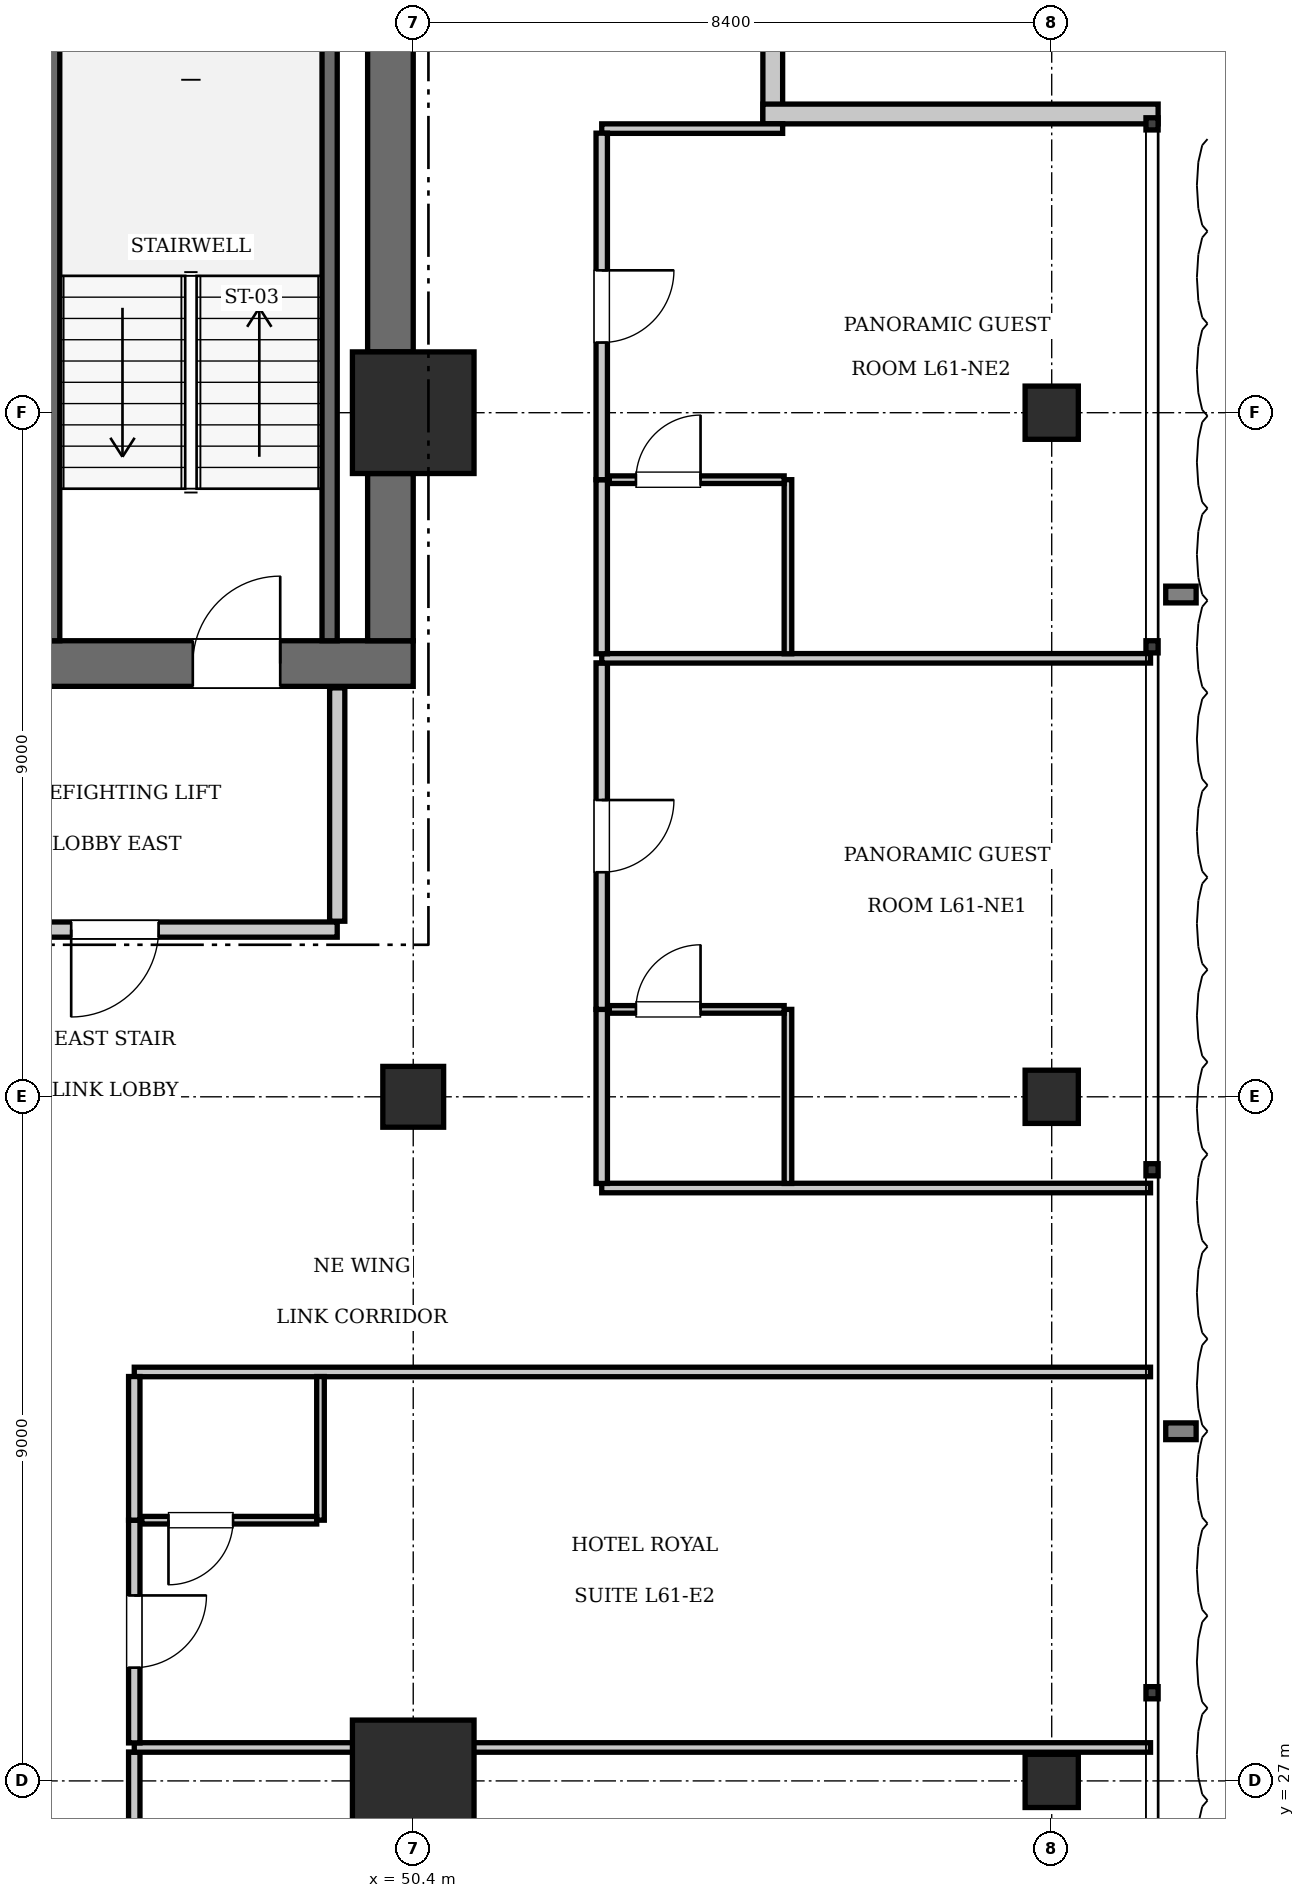
"""IFC4 building model, lengths in metres.
Left out: names, types, materials, properties, quantities, classifications, styles, units other than length and angle.
Written with IfcOpenShell. Run it as: python <this file> out.ifc"""

import sys

from ifc_helpers import new_model, si_unit, direction, frame, frame_2d, origin, origin_2d, place, context, subcontext, project, spatial, rectangle, extrude, element, fill, save


model = new_model("IFC4")
c1 = context("Model", 3, precision=1e-05, world=origin(), true_north=direction((0.0, 1.0)))
c2 = subcontext(c1, "Body", "Model", "MODEL_VIEW")
j1 = project(units=[si_unit("LENGTHUNIT", "METRE"), si_unit("PLANEANGLEUNIT", "RADIAN")], contexts=[c1])
p1 = place(None, origin())
s1 = spatial("IfcSite", under=j1, at=p1, CompositionType="ELEMENT")
p2 = place(p1, origin())
s2 = spatial("IfcBuilding", under=s1, at=p2, CompositionType="ELEMENT")
p3 = place(p2, frame((0.0, 0.0, 250.95)))
s3 = spatial("IfcBuildingStorey", under=s2, at=p3, CompositionType="ELEMENT", Elevation=250.95)
for number, where, z_axis, x_axis in (
    (1, (50.4, 27.0, 0.0), (0.0, 0.0, 1.0), (1.0, 0.0, 0.0)),
    (2, (50.4, 45.0, 0.0), (0.0, 0.0, 1.0), (1.0, 0.0, 0.0)),
):
    element("IfcColumn", number, at=place(p3, frame(where, z_axis=z_axis, x_axis=x_axis)), inside=s3, PredefinedType="COLUMN", context=c2, shape_type="SweptSolid", body=[
        extrude(rectangle(XDim=1.6, YDim=1.6, at=origin_2d()), origin(), (0.0, 0.0, 1.0), 3.85),
    ])
p4 = place(p3, frame((43.6, 41.7, 0.0), z_axis=(0.0, 0.0, 1.0), x_axis=(1.0, 0.0, 0.0)))
e3 = element("IfcWall", 3, at=p4, inside=s3, PredefinedType="SHEAR", context=c2, shape_type="SweptSolid", body=[
    extrude(rectangle(XDim=6.8, YDim=0.6, at=frame_2d((3.4, 0.0))), origin(), (0.0, 0.0, 1.0), 3.85),
])
p5 = place(p4, frame((3.9, 0.0, 0.0)))
e4 = element("IfcOpeningElement", 4, at=p5, cuts=e3, PredefinedType="OPENING", context=c2, shape_type="SweptSolid", body=[
    extrude(rectangle(XDim=1.15, YDim=2.15, at=frame_2d((0.575, 1.075))), frame((0.0, 0.31, 0.0), z_axis=(0.0, -1.0, 0.0), x_axis=(1.0, 0.0, 0.0)), (0.0, 0.0, 1.0), 0.62),
])
p6 = place(p4, frame((0.55, 0.0, 0.0)))
e5 = element("IfcOpeningElement", 5, at=p6, cuts=e3, PredefinedType="OPENING", context=c2, shape_type="SweptSolid", body=[
    extrude(rectangle(XDim=1.1, YDim=2.2, at=frame_2d((0.55, 1.1))), frame((0.0, 0.31, 0.0), z_axis=(0.0, -1.0, 0.0), x_axis=(1.0, 0.0, 0.0)), (0.0, 0.0, 1.0), 0.62),
])
p7 = place(p3, frame((50.1, 42.0, 0.0), z_axis=(0.0, 0.0, 1.0), x_axis=(0.0, 1.0, 0.0)))
e6 = element("IfcWall", 6, at=p7, inside=s3, PredefinedType="SHEAR", context=c2, shape_type="SweptSolid", body=[
    extrude(rectangle(XDim=2.2, YDim=0.6, at=frame_2d((1.1, 0.0))), origin(), (0.0, 0.0, 1.0), 3.85),
])
p8 = place(p3, frame((50.1, 45.8, 0.0), z_axis=(0.0, 0.0, 1.0), x_axis=(0.0, 1.0, 0.0)))
e7 = element("IfcWall", 7, at=p8, inside=s3, PredefinedType="SHEAR", context=c2, shape_type="SweptSolid", body=[
    extrude(rectangle(XDim=7.6, YDim=0.6, at=frame_2d((3.8, 0.0))), origin(), (0.0, 0.0, 1.0), 3.85),
])
p9 = place(p3, frame((50.4, 36.0, 0.0), z_axis=(0.0, 0.0, 1.0), x_axis=(1.0, 0.0, 0.0)))
e8 = element("IfcColumn", 8, at=p9, inside=s3, PredefinedType="COLUMN", context=c2, shape_type="SweptSolid", body=[
    extrude(rectangle(XDim=0.8, YDim=0.8, at=origin_2d()), origin(), (0.0, 0.0, 1.0), 3.85),
])
for number, where, z_axis, x_axis in (
    (9, (58.8, 27.0, 0.0), (0.0, 0.0, 1.0), (1.0, 0.0, 0.0)),
    (10, (58.8, 36.0, 0.0), (0.0, 0.0, 1.0), (1.0, 0.0, 0.0)),
    (11, (58.8, 45.0, 0.0), (0.0, 0.0, 1.0), (1.0, 0.0, 0.0)),
):
    element("IfcColumn", number, at=place(p3, frame(where, z_axis=z_axis, x_axis=x_axis)), inside=s3, PredefinedType="COLUMN", context=c2, shape_type="SweptSolid", body=[
        extrude(rectangle(XDim=0.7, YDim=0.7, at=origin_2d()), origin(), (0.0, 0.0, 1.0), 3.85),
    ])
p10 = place(p3, frame((45.65, 42.0, 0.0), z_axis=(0.0, 0.0, 1.0), x_axis=(0.0, 1.0, 0.0)))
e12 = element("IfcWall", 12, at=p10, inside=s3, PredefinedType="SOLIDWALL", context=c2, shape_type="SweptSolid", body=[
    extrude(rectangle(XDim=9.15, YDim=0.2, at=frame_2d((4.575, 0.0))), origin(), (0.0, 0.0, 1.0), 3.61),
])
p11 = place(p3, frame((49.3, 42.0, 0.0), z_axis=(0.0, 0.0, 1.0), x_axis=(0.0, 1.0, 0.0)))
e13 = element("IfcWall", 13, at=p11, inside=s3, PredefinedType="SOLIDWALL", context=c2, shape_type="SweptSolid", body=[
    extrude(rectangle(XDim=9.12, YDim=0.2, at=frame_2d((4.56, 0.0))), origin(), (0.0, 0.0, 1.0), 3.61),
])
for number, where, z_axis, x_axis in (
    (14, (55.13, 54.0, 0.0), (0.0, 0.0, 1.0), (0.0, -1.0, 0.0)),
    (15, (55.0, 48.93, 0.0), (0.0, 0.0, 1.0), (1.0, 0.0, 0.0)),
):
    element("IfcWall", number, at=place(p3, frame(where, z_axis=z_axis, x_axis=x_axis)), inside=s3, PredefinedType="SOLIDWALL", context=c2, shape_type="SweptSolid", body=[
        extrude(rectangle(XDim=5.2, YDim=0.26, at=frame_2d((2.6, 0.0))), origin(), (0.0, 0.0, 1.0), 3.61),
    ])
p12 = place(p3, frame((43.6, 38.2, 0.0), z_axis=(0.0, 0.0, 1.0), x_axis=(1.0, 0.0, 0.0)))
e16 = element("IfcWall", 16, at=p12, inside=s3, PredefinedType="PARTITIONING", context=c2, shape_type="SweptSolid", body=[
    extrude(rectangle(XDim=5.8, YDim=0.2, at=frame_2d((2.9, 0.0))), origin(), (0.0, 0.0, 1.0), 3.61),
])
p13 = place(p12, frame((2.3, 0.0, 0.0)))
e17 = element("IfcOpeningElement", 17, at=p13, cuts=e16, PredefinedType="OPENING", context=c2, shape_type="SweptSolid", body=[
    extrude(rectangle(XDim=1.15, YDim=2.15, at=frame_2d((0.575, 1.075))), frame((0.0, 0.11, 0.0), z_axis=(0.0, -1.0, 0.0), x_axis=(1.0, 0.0, 0.0)), (0.0, 0.0, 1.0), 0.22),
])
p14 = place(p3, frame((49.4, 38.31, 0.0), z_axis=(0.0, 0.0, 1.0), x_axis=(0.0, 1.0, 0.0)))
e18 = element("IfcWall", 18, at=p14, inside=s3, PredefinedType="PARTITIONING", context=c2, shape_type="SweptSolid", body=[
    extrude(rectangle(XDim=3.07, YDim=0.2, at=frame_2d((1.535, 0.0))), origin(), (0.0, 0.0, 1.0), 3.61),
])
p15 = place(p3, frame((46.73, 32.38, 0.0), z_axis=(0.0, 0.0, 1.0), x_axis=(1.0, 0.0, 0.0)))
e19 = element("IfcWall", 19, at=p15, inside=s3, PredefinedType="PARTITIONING", context=c2, shape_type="SweptSolid", body=[
    extrude(rectangle(XDim=13.37, YDim=0.125, at=frame_2d((6.685, 0.0))), origin(), (0.0, 0.0, 1.0), 3.61),
])
p16 = place(p3, frame((46.73, 24.45, 0.0), z_axis=(0.0, 0.0, 1.0), x_axis=(0.0, 1.0, 0.0)))
e20 = element("IfcWall", 20, at=p16, inside=s3, PredefinedType="PARTITIONING", context=c2, shape_type="SweptSolid", body=[
    extrude(rectangle(XDim=2.93, YDim=0.15, at=frame_2d((1.465, 0.0))), origin(), (0.0, 0.0, 1.0), 3.61),
])
p17 = place(p16, frame((0.99, 0.0, 0.0)))
e21 = element("IfcOpeningElement", 21, at=p17, cuts=e20, PredefinedType="OPENING", context=c2, shape_type="SweptSolid", body=[
    extrude(rectangle(XDim=0.95, YDim=2.15, at=frame_2d((0.475, 1.075))), frame((0.0, 0.085, 0.0), z_axis=(0.0, -1.0, 0.0), x_axis=(1.0, 0.0, 0.0)), (0.0, 0.0, 1.0), 0.17),
])
p18 = place(p3, frame((46.73, 27.44, 0.0), z_axis=(0.0, 0.0, 1.0), x_axis=(1.0, 0.0, 0.0)))
e22 = element("IfcWall", 22, at=p18, inside=s3, PredefinedType="PARTITIONING", context=c2, shape_type="SweptSolid", body=[
    extrude(rectangle(XDim=13.37, YDim=0.125, at=frame_2d((6.685, 0.0))), origin(), (0.0, 0.0, 1.0), 3.61),
])
p19 = place(p3, frame((46.73, 27.5, 0.0), z_axis=(0.0, 0.0, 1.0), x_axis=(0.0, 1.0, 0.0)))
e23 = element("IfcWall", 23, at=p19, inside=s3, PredefinedType="PARTITIONING", context=c2, shape_type="SweptSolid", body=[
    extrude(rectangle(XDim=2.93, YDim=0.15, at=frame_2d((1.465, 0.0))), origin(), (0.0, 0.0, 1.0), 3.61),
])
p20 = place(p19, frame((0.99, 0.0, 0.0)))
e24 = element("IfcOpeningElement", 24, at=p20, cuts=e23, PredefinedType="OPENING", context=c2, shape_type="SweptSolid", body=[
    extrude(rectangle(XDim=0.95, YDim=2.15, at=frame_2d((0.475, 1.075))), frame((0.0, 0.085, 0.0), z_axis=(0.0, -1.0, 0.0), x_axis=(1.0, 0.0, 0.0)), (0.0, 0.0, 1.0), 0.17),
])
p21 = place(p3, frame((46.73, 30.43, 0.0), z_axis=(0.0, 0.0, 1.0), x_axis=(0.0, 1.0, 0.0)))
e25 = element("IfcWall", 25, at=p21, inside=s3, PredefinedType="PARTITIONING", context=c2, shape_type="SweptSolid", body=[
    extrude(rectangle(XDim=1.89, YDim=0.15, at=frame_2d((0.945, 0.0))), origin(), (0.0, 0.0, 1.0), 3.61),
])
p22 = place(p3, frame((49.18, 30.43, 0.0), z_axis=(0.0, 0.0, 1.0), x_axis=(0.0, 1.0, 0.0)))
e26 = element("IfcWall", 26, at=p22, inside=s3, PredefinedType="PARTITIONING", context=c2, shape_type="SweptSolid", body=[
    extrude(rectangle(XDim=1.89, YDim=0.1, at=frame_2d((0.945, 0.0))), origin(), (0.0, 0.0, 1.0), 3.61),
])
p23 = place(p3, frame((46.83, 30.43, 0.0), z_axis=(0.0, 0.0, 1.0), x_axis=(1.0, 0.0, 0.0)))
e27 = element("IfcWall", 27, at=p23, inside=s3, PredefinedType="PARTITIONING", context=c2, shape_type="SweptSolid", body=[
    extrude(rectangle(XDim=2.3, YDim=0.1, at=frame_2d((1.15, 0.0))), origin(), (0.0, 0.0, 1.0), 3.61),
])
p24 = place(p23, frame((0.35, 0.0, 0.0)))
e28 = element("IfcOpeningElement", 28, at=p24, cuts=e27, PredefinedType="OPENING", context=c2, shape_type="SweptSolid", body=[
    extrude(rectangle(XDim=0.85, YDim=2.1, at=frame_2d((0.425, 1.05))), frame((0.0, 0.06, 0.0), z_axis=(0.0, -1.0, 0.0), x_axis=(1.0, 0.0, 0.0)), (0.0, 0.0, 1.0), 0.12),
])
p25 = place(p3, frame((52.88, 34.8, 0.0), z_axis=(0.0, 0.0, 1.0), x_axis=(1.0, 0.0, 0.0)))
e29 = element("IfcWall", 29, at=p25, inside=s3, PredefinedType="PARTITIONING", context=c2, shape_type="SweptSolid", body=[
    extrude(rectangle(XDim=7.22, YDim=0.125, at=frame_2d((3.61, 0.0))), origin(), (0.0, 0.0, 1.0), 3.61),
])
p26 = place(p3, frame((52.88, 48.738, 0.0), z_axis=(0.0, 0.0, 1.0), x_axis=(1.0, 0.0, 0.0)))
e30 = element("IfcWall", 30, at=p26, inside=s3, PredefinedType="PARTITIONING", context=c2, shape_type="SweptSolid", body=[
    extrude(rectangle(XDim=2.38, YDim=0.125, at=frame_2d((1.19, 0.0))), origin(), (0.0, 0.0, 1.0), 3.61),
])
p27 = place(p3, frame((52.88, 34.86, 0.0), z_axis=(0.0, 0.0, 1.0), x_axis=(0.0, 1.0, 0.0)))
e31 = element("IfcWall", 31, at=p27, inside=s3, PredefinedType="PARTITIONING", context=c2, shape_type="SweptSolid", body=[
    extrude(rectangle(XDim=2.29, YDim=0.15, at=frame_2d((1.145, 0.0))), origin(), (0.0, 0.0, 1.0), 3.61),
])
p28 = place(p3, frame((52.88, 37.15, 0.0), z_axis=(0.0, 0.0, 1.0), x_axis=(0.0, 1.0, 0.0)))
e32 = element("IfcWall", 32, at=p28, inside=s3, PredefinedType="PARTITIONING", context=c2, shape_type="SweptSolid", body=[
    extrude(rectangle(XDim=4.559, YDim=0.15, at=frame_2d((2.279, 0.0))), origin(), (0.0, 0.0, 1.0), 3.61),
])
p29 = place(p28, frame((1.804, 0.0, 0.0)))
e33 = element("IfcOpeningElement", 33, at=p29, cuts=e32, PredefinedType="OPENING", context=c2, shape_type="SweptSolid", body=[
    extrude(rectangle(XDim=0.95, YDim=2.15, at=frame_2d((0.475, 1.075))), frame((0.0, 0.085, 0.0), z_axis=(0.0, -1.0, 0.0), x_axis=(1.0, 0.0, 0.0)), (0.0, 0.0, 1.0), 0.17),
])
p30 = place(p3, frame((55.33, 34.86, 0.0), z_axis=(0.0, 0.0, 1.0), x_axis=(0.0, 1.0, 0.0)))
e34 = element("IfcWall", 34, at=p30, inside=s3, PredefinedType="PARTITIONING", context=c2, shape_type="SweptSolid", body=[
    extrude(rectangle(XDim=2.29, YDim=0.1, at=frame_2d((1.145, 0.0))), origin(), (0.0, 0.0, 1.0), 3.61),
])
p31 = place(p3, frame((52.98, 37.15, 0.0), z_axis=(0.0, 0.0, 1.0), x_axis=(1.0, 0.0, 0.0)))
e35 = element("IfcWall", 35, at=p31, inside=s3, PredefinedType="PARTITIONING", context=c2, shape_type="SweptSolid", body=[
    extrude(rectangle(XDim=2.3, YDim=0.1, at=frame_2d((1.15, 0.0))), origin(), (0.0, 0.0, 1.0), 3.61),
])
p32 = place(p31, frame((0.35, 0.0, 0.0)))
e36 = element("IfcOpeningElement", 36, at=p32, cuts=e35, PredefinedType="OPENING", context=c2, shape_type="SweptSolid", body=[
    extrude(rectangle(XDim=0.85, YDim=2.1, at=frame_2d((0.425, 1.05))), frame((0.0, 0.06, 0.0), z_axis=(0.0, -1.0, 0.0), x_axis=(1.0, 0.0, 0.0)), (0.0, 0.0, 1.0), 0.12),
])
p33 = place(p3, frame((52.88, 41.769, 0.0), z_axis=(0.0, 0.0, 1.0), x_axis=(1.0, 0.0, 0.0)))
e37 = element("IfcWall", 37, at=p33, inside=s3, PredefinedType="PARTITIONING", context=c2, shape_type="SweptSolid", body=[
    extrude(rectangle(XDim=7.22, YDim=0.125, at=frame_2d((3.61, 0.0))), origin(), (0.0, 0.0, 1.0), 3.61),
])
p34 = place(p3, frame((52.88, 41.829, 0.0), z_axis=(0.0, 0.0, 1.0), x_axis=(0.0, 1.0, 0.0)))
e38 = element("IfcWall", 38, at=p34, inside=s3, PredefinedType="PARTITIONING", context=c2, shape_type="SweptSolid", body=[
    extrude(rectangle(XDim=2.29, YDim=0.15, at=frame_2d((1.145, 0.0))), origin(), (0.0, 0.0, 1.0), 3.61),
])
p35 = place(p3, frame((52.88, 44.119, 0.0), z_axis=(0.0, 0.0, 1.0), x_axis=(0.0, 1.0, 0.0)))
e39 = element("IfcWall", 39, at=p35, inside=s3, PredefinedType="PARTITIONING", context=c2, shape_type="SweptSolid", body=[
    extrude(rectangle(XDim=4.559, YDim=0.15, at=frame_2d((2.279, 0.0))), origin(), (0.0, 0.0, 1.0), 3.61),
])
p36 = place(p35, frame((1.804, 0.0, 0.0)))
e40 = element("IfcOpeningElement", 40, at=p36, cuts=e39, PredefinedType="OPENING", context=c2, shape_type="SweptSolid", body=[
    extrude(rectangle(XDim=0.95, YDim=2.15, at=frame_2d((0.475, 1.075))), frame((0.0, 0.085, 0.0), z_axis=(0.0, -1.0, 0.0), x_axis=(1.0, 0.0, 0.0)), (0.0, 0.0, 1.0), 0.17),
])
p37 = place(p3, frame((55.33, 41.829, 0.0), z_axis=(0.0, 0.0, 1.0), x_axis=(0.0, 1.0, 0.0)))
e41 = element("IfcWall", 41, at=p37, inside=s3, PredefinedType="PARTITIONING", context=c2, shape_type="SweptSolid", body=[
    extrude(rectangle(XDim=2.29, YDim=0.1, at=frame_2d((1.145, 0.0))), origin(), (0.0, 0.0, 1.0), 3.61),
])
p38 = place(p3, frame((52.98, 44.119, 0.0), z_axis=(0.0, 0.0, 1.0), x_axis=(1.0, 0.0, 0.0)))
e42 = element("IfcWall", 42, at=p38, inside=s3, PredefinedType="PARTITIONING", context=c2, shape_type="SweptSolid", body=[
    extrude(rectangle(XDim=2.3, YDim=0.1, at=frame_2d((1.15, 0.0))), origin(), (0.0, 0.0, 1.0), 3.61),
])
p39 = place(p38, frame((0.35, 0.0, 0.0)))
e43 = element("IfcOpeningElement", 43, at=p39, cuts=e42, PredefinedType="OPENING", context=c2, shape_type="SweptSolid", body=[
    extrude(rectangle(XDim=0.85, YDim=2.1, at=frame_2d((0.425, 1.05))), frame((0.0, 0.06, 0.0), z_axis=(0.0, -1.0, 0.0), x_axis=(1.0, 0.0, 0.0)), (0.0, 0.0, 1.0), 0.12),
])
p40 = place(p5, origin())
e44 = element("IfcDoor", 44, at=p40, inside=s3, OperationType="SINGLE_SWING_RIGHT", PredefinedType="DOOR", context=c2, shape_type="SweptSolid", body=[
    extrude(rectangle(XDim=1.15, YDim=2.15, at=frame_2d((0.575, 1.075))), frame((0.0, 0.025, 0.0), z_axis=(0.0, -1.0, 0.0), x_axis=(1.0, 0.0, 0.0)), (0.0, 0.0, 1.0), 0.05),
])
fill(e4, e44)
p41 = place(p13, frame((1.15, 0.0, 0.0), z_axis=(0.0, 0.0, 1.0), x_axis=(-1.0, 0.0, 0.0)))
e45 = element("IfcDoor", 45, at=p41, inside=s3, OperationType="SINGLE_SWING_RIGHT", PredefinedType="DOOR", context=c2, shape_type="SweptSolid", body=[
    extrude(rectangle(XDim=1.15, YDim=2.15, at=frame_2d((0.575, 1.075))), frame((0.0, 0.025, 0.0), z_axis=(0.0, -1.0, 0.0), x_axis=(1.0, 0.0, 0.0)), (0.0, 0.0, 1.0), 0.05),
])
fill(e17, e45)
p42 = place(p24, frame((0.85, 0.0, 0.0), z_axis=(0.0, 0.0, 1.0), x_axis=(-1.0, 0.0, 0.0)))
e46 = element("IfcDoor", 46, at=p42, inside=s3, OperationType="SINGLE_SWING_RIGHT", PredefinedType="DOOR", context=c2, shape_type="SweptSolid", body=[
    extrude(rectangle(XDim=0.85, YDim=2.1, at=frame_2d((0.425, 1.05))), frame((0.0, 0.025, 0.0), z_axis=(0.0, -1.0, 0.0), x_axis=(1.0, 0.0, 0.0)), (0.0, 0.0, 1.0), 0.05),
])
fill(e28, e46)
p43 = place(p20, frame((0.95, 0.0, 0.0), z_axis=(0.0, 0.0, 1.0), x_axis=(-1.0, 0.0, 0.0)))
e47 = element("IfcDoor", 47, at=p43, inside=s3, OperationType="SINGLE_SWING_LEFT", PredefinedType="DOOR", context=c2, shape_type="SweptSolid", body=[
    extrude(rectangle(XDim=0.95, YDim=2.15, at=frame_2d((0.475, 1.075))), frame((0.0, 0.025, 0.0), z_axis=(0.0, -1.0, 0.0), x_axis=(1.0, 0.0, 0.0)), (0.0, 0.0, 1.0), 0.05),
])
fill(e24, e47)
p44 = place(p32, origin())
e48 = element("IfcDoor", 48, at=p44, inside=s3, OperationType="SINGLE_SWING_RIGHT", PredefinedType="DOOR", context=c2, shape_type="SweptSolid", body=[
    extrude(rectangle(XDim=0.85, YDim=2.1, at=frame_2d((0.425, 1.05))), frame((0.0, 0.025, 0.0), z_axis=(0.0, -1.0, 0.0), x_axis=(1.0, 0.0, 0.0)), (0.0, 0.0, 1.0), 0.05),
])
fill(e36, e48)
p45 = place(p29, frame((0.95, 0.0, 0.0), z_axis=(0.0, 0.0, 1.0), x_axis=(-1.0, 0.0, 0.0)))
e49 = element("IfcDoor", 49, at=p45, inside=s3, OperationType="SINGLE_SWING_LEFT", PredefinedType="DOOR", context=c2, shape_type="SweptSolid", body=[
    extrude(rectangle(XDim=0.95, YDim=2.15, at=frame_2d((0.475, 1.075))), frame((0.0, 0.025, 0.0), z_axis=(0.0, -1.0, 0.0), x_axis=(1.0, 0.0, 0.0)), (0.0, 0.0, 1.0), 0.05),
])
fill(e33, e49)
p46 = place(p39, origin())
e50 = element("IfcDoor", 50, at=p46, inside=s3, OperationType="SINGLE_SWING_RIGHT", PredefinedType="DOOR", context=c2, shape_type="SweptSolid", body=[
    extrude(rectangle(XDim=0.85, YDim=2.1, at=frame_2d((0.425, 1.05))), frame((0.0, 0.025, 0.0), z_axis=(0.0, -1.0, 0.0), x_axis=(1.0, 0.0, 0.0)), (0.0, 0.0, 1.0), 0.05),
])
fill(e43, e50)
p47 = place(p36, frame((0.95, 0.0, 0.0), z_axis=(0.0, 0.0, 1.0), x_axis=(-1.0, 0.0, 0.0)))
e51 = element("IfcDoor", 51, at=p47, inside=s3, OperationType="SINGLE_SWING_LEFT", PredefinedType="DOOR", context=c2, shape_type="SweptSolid", body=[
    extrude(rectangle(XDim=0.95, YDim=2.15, at=frame_2d((0.475, 1.075))), frame((0.0, 0.025, 0.0), z_axis=(0.0, -1.0, 0.0), x_axis=(1.0, 0.0, 0.0)), (0.0, 0.0, 1.0), 0.05),
])
fill(e40, e51)
save(model, sys.argv[1])
